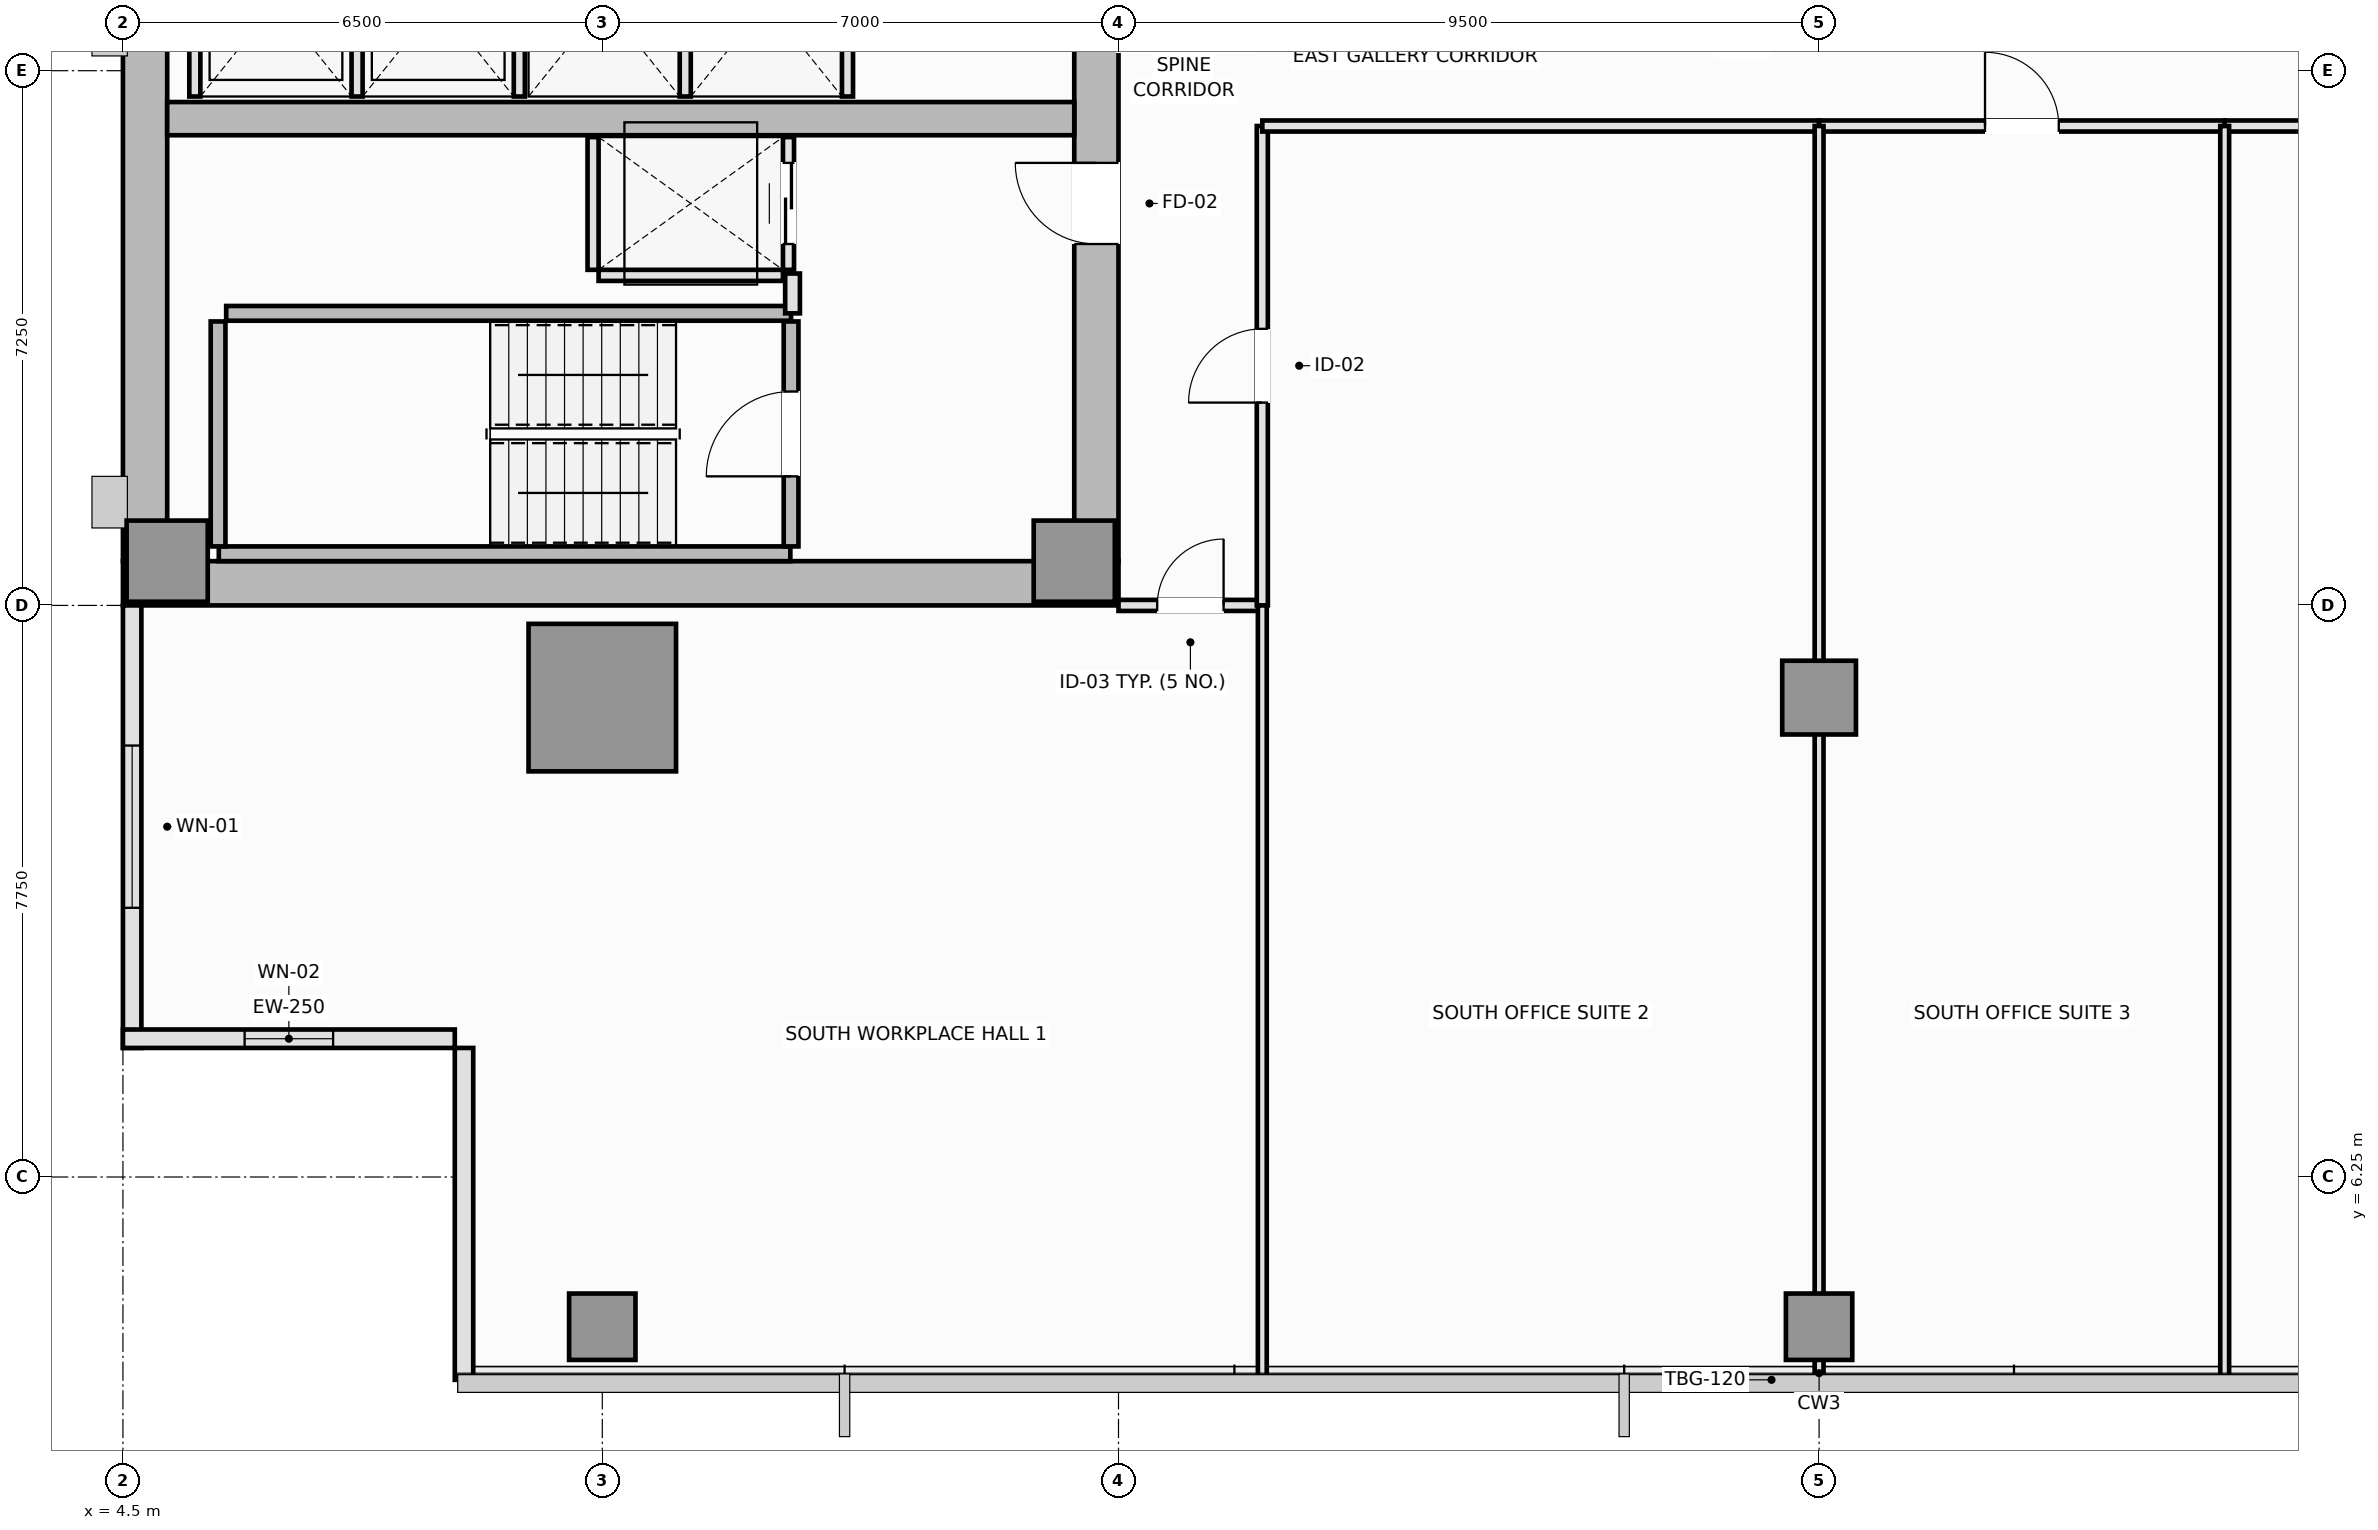
"""IFC4 building model, lengths in metres.
Left out: names, types, materials, properties, quantities, classifications, styles, units other than length and angle.
Written with IfcOpenShell. Run it as: python <this file> out.ifc"""

import sys

from ifc_helpers import new_model, si_unit, direction, frame, frame_2d, origin, origin_2d, place, context, subcontext, project, spatial, rectangle, extrude, element, fill, save


model = new_model("IFC4")
c1 = context("Model", 3, precision=1e-05, world=origin(), true_north=direction((0.0, 1.0)))
c2 = subcontext(c1, "Body", "Model", "MODEL_VIEW")
j1 = project(units=[si_unit("LENGTHUNIT", "METRE"), si_unit("PLANEANGLEUNIT", "RADIAN")], contexts=[c1])
p1 = place(None, origin())
s1 = spatial("IfcSite", under=j1, at=p1, CompositionType="ELEMENT")
p2 = place(p1, origin())
s2 = spatial("IfcBuilding", under=s1, at=p2, CompositionType="ELEMENT")
p3 = place(p2, frame((0.0, 0.0, 105.8)))
s3 = spatial("IfcBuildingStorey", under=s2, at=p3, CompositionType="ELEMENT", Elevation=105.8)
p4 = place(p3, frame((4.5, 14.3, 0.0), z_axis=(0.0, 0.0, 1.0), x_axis=(1.0, 0.0, 0.0)))
e1 = element("IfcWall", 1, at=p4, inside=s3, PredefinedType="SHEAR", context=c2, shape_type="SweptSolid", body=[
    extrude(rectangle(XDim=13.5, YDim=0.6, at=frame_2d((6.75, 0.0))), origin(), (0.0, 0.0, 1.0), 3.55),
])
p5 = place(p3, frame((4.8, 14.6, 0.0), z_axis=(0.0, 0.0, 1.0), x_axis=(0.0, 1.0, 0.0)))
e2 = element("IfcWall", 2, at=p5, inside=s3, PredefinedType="SHEAR", context=c2, shape_type="SweptSolid", body=[
    extrude(rectangle(XDim=21.3, YDim=0.6, at=frame_2d((10.65, 0.0))), origin(), (0.0, 0.0, 1.0), 3.55),
])
p6 = place(p3, frame((17.7, 14.6, 0.0), z_axis=(0.0, 0.0, 1.0), x_axis=(0.0, 1.0, 0.0)))
e3 = element("IfcWall", 3, at=p6, inside=s3, PredefinedType="SHEAR", context=c2, shape_type="SweptSolid", body=[
    extrude(rectangle(XDim=8.85, YDim=0.6, at=frame_2d((4.425, 0.0))), origin(), (0.0, 0.0, 1.0), 3.55),
])
p7 = place(p6, frame((4.3, 0.0, 0.0)))
e4 = element("IfcOpeningElement", 4, at=p7, cuts=e3, PredefinedType="OPENING", context=c2, shape_type="SweptSolid", body=[
    extrude(rectangle(XDim=1.1, YDim=2.15, at=frame_2d((0.55, 1.075))), frame((0.0, 0.31, 0.0), z_axis=(0.0, -1.0, 0.0), x_axis=(1.0, 0.0, 0.0)), (0.0, 0.0, 1.0), 0.62),
])
p8 = place(p3, frame((5.1, 20.6, 0.0), z_axis=(0.0, 0.0, 1.0), x_axis=(1.0, 0.0, 0.0)))
e5 = element("IfcWall", 5, at=p8, inside=s3, PredefinedType="SHEAR", context=c2, shape_type="SweptSolid", body=[
    extrude(rectangle(XDim=12.3, YDim=0.45, at=frame_2d((6.15, 0.0))), origin(), (0.0, 0.0, 1.0), 3.55),
])
for number, where, z_axis, x_axis in (
    (6, (5.1, 14.6, 0.0), (0.0, 0.0, 1.0), (1.0, 0.0, 0.0)),
    (7, (17.4, 14.6, 0.0), (0.0, 0.0, 1.0), (1.0, 0.0, 0.0)),
):
    element("IfcColumn", number, at=place(p3, frame(where, z_axis=z_axis, x_axis=x_axis)), inside=s3, PredefinedType="PILASTER", context=c2, shape_type="SweptSolid", body=[
        extrude(rectangle(XDim=1.1, YDim=1.1, at=origin_2d()), origin(), (0.0, 0.0, 1.0), 3.55),
    ])
p9 = place(p3, frame((11.0, 12.75, 0.0), z_axis=(0.0, 0.0, 1.0), x_axis=(1.0, 0.0, 0.0)))
e8 = element("IfcColumn", 8, at=p9, inside=s3, PredefinedType="COLUMN", context=c2, shape_type="SweptSolid", body=[
    extrude(rectangle(XDim=2.0, YDim=2.0, at=origin_2d()), origin(), (0.0, 0.0, 1.0), 3.55),
])
p10 = place(p3, frame((27.5, 12.75, 0.0), z_axis=(0.0, 0.0, 1.0), x_axis=(1.0, 0.0, 0.0)))
e9 = element("IfcColumn", 9, at=p10, inside=s3, PredefinedType="COLUMN", context=c2, shape_type="SweptSolid", body=[
    extrude(rectangle(XDim=1.0, YDim=1.0, at=origin_2d()), origin(), (0.0, 0.0, 1.0), 3.55),
])
for number, where, z_axis, x_axis in (
    (10, (11.0, 4.22, 0.0), (0.0, 0.0, 1.0), (1.0, 0.0, 0.0)),
    (11, (27.5, 4.22, 0.0), (0.0, 0.0, 1.0), (1.0, 0.0, 0.0)),
):
    element("IfcColumn", number, at=place(p3, frame(where, z_axis=z_axis, x_axis=x_axis)), inside=s3, PredefinedType="COLUMN", context=c2, shape_type="SweptSolid", body=[
        extrude(rectangle(XDim=0.9, YDim=0.9, at=origin_2d()), origin(), (0.0, 0.0, 1.0), 3.55),
    ])
p11 = place(p3, frame((4.625, 14.0, 0.0), z_axis=(0.0, 0.0, 1.0), x_axis=(0.0, -1.0, 0.0)))
e12 = element("IfcWall", 12, at=p11, inside=s3, PredefinedType="SOLIDWALL", context=c2, shape_type="SweptSolid", body=[
    extrude(rectangle(XDim=6.0, YDim=0.25, at=frame_2d((3.0, 0.0))), origin(), (0.0, 0.0, 1.0), 3.37),
])
p12 = place(p11, frame((1.9, 0.0, 0.9)))
e13 = element("IfcOpeningElement", 13, at=p12, cuts=e12, PredefinedType="OPENING", context=c2, shape_type="SweptSolid", body=[
    extrude(rectangle(XDim=2.2, YDim=1.8, at=frame_2d((1.1, 0.9))), frame((0.0, 0.135, 0.0), z_axis=(0.0, -1.0, 0.0), x_axis=(1.0, 0.0, 0.0)), (0.0, 0.0, 1.0), 0.27),
])
p13 = place(p3, frame((4.5, 8.125, 0.0), z_axis=(0.0, 0.0, 1.0), x_axis=(1.0, 0.0, 0.0)))
e14 = element("IfcWall", 14, at=p13, inside=s3, PredefinedType="SOLIDWALL", context=c2, shape_type="SweptSolid", body=[
    extrude(rectangle(XDim=4.5, YDim=0.25, at=frame_2d((2.25, 0.0))), origin(), (0.0, 0.0, 1.0), 3.37),
])
p14 = place(p13, frame((1.65, 0.0, 0.9)))
e15 = element("IfcOpeningElement", 15, at=p14, cuts=e14, PredefinedType="OPENING", context=c2, shape_type="SweptSolid", body=[
    extrude(rectangle(XDim=1.2, YDim=1.8, at=frame_2d((0.6, 0.9))), frame((0.0, 0.135, 0.0), z_axis=(0.0, -1.0, 0.0), x_axis=(1.0, 0.0, 0.0)), (0.0, 0.0, 1.0), 0.27),
])
p15 = place(p3, frame((9.125, 8.0, 0.0), z_axis=(0.0, 0.0, 1.0), x_axis=(0.0, -1.0, 0.0)))
e16 = element("IfcWall", 16, at=p15, inside=s3, PredefinedType="SOLIDWALL", context=c2, shape_type="SweptSolid", body=[
    extrude(rectangle(XDim=4.5, YDim=0.25, at=frame_2d((2.25, 0.0))), origin(), (0.0, 0.0, 1.0), 3.37),
])
p16 = place(p3, frame((5.8, 14.7, 0.0), z_axis=(0.0, 0.0, 1.0), x_axis=(1.0, 0.0, 0.0)))
e17 = element("IfcWall", 17, at=p16, inside=s3, PredefinedType="SOLIDWALL", context=c2, shape_type="SweptSolid", body=[
    extrude(rectangle(XDim=7.75, YDim=0.2, at=frame_2d((3.875, 0.0))), origin(), (0.0, 0.0, 1.0), 3.55),
])
p17 = place(p3, frame((5.79, 14.8, 0.0), z_axis=(0.0, 0.0, 1.0), x_axis=(0.0, 1.0, 0.0)))
e18 = element("IfcWall", 18, at=p17, inside=s3, PredefinedType="SOLIDWALL", context=c2, shape_type="SweptSolid", body=[
    extrude(rectangle(XDim=3.05, YDim=0.2, at=frame_2d((1.525, 0.0))), origin(), (0.0, 0.0, 1.0), 3.55),
])
p18 = place(p3, frame((5.9, 17.96, 0.0), z_axis=(0.0, 0.0, 1.0), x_axis=(1.0, 0.0, 0.0)))
e19 = element("IfcWall", 19, at=p18, inside=s3, PredefinedType="SOLIDWALL", context=c2, shape_type="SweptSolid", body=[
    extrude(rectangle(XDim=7.66, YDim=0.2, at=frame_2d((3.83, 0.0))), origin(), (0.0, 0.0, 1.0), 3.55),
])
p19 = place(p3, frame((13.56, 14.8, 0.0), z_axis=(0.0, 0.0, 1.0), x_axis=(0.0, 1.0, 0.0)))
e20 = element("IfcWall", 20, at=p19, inside=s3, PredefinedType="SOLIDWALL", context=c2, shape_type="SweptSolid", body=[
    extrude(rectangle(XDim=3.05, YDim=0.2, at=frame_2d((1.525, 0.0))), origin(), (0.0, 0.0, 1.0), 3.55),
])
p20 = place(p19, frame((0.95, 0.0, 0.0)))
e21 = element("IfcOpeningElement", 21, at=p20, cuts=e20, PredefinedType="OPENING", context=c2, shape_type="SweptSolid", body=[
    extrude(rectangle(XDim=1.15, YDim=2.15, at=frame_2d((0.575, 1.075))), frame((0.0, 0.11, 0.0), z_axis=(0.0, -1.0, 0.0), x_axis=(1.0, 0.0, 0.0)), (0.0, 0.0, 1.0), 0.22),
])
for number, where, z_axis, x_axis in (
    (22, (5.475, 20.9, 0.0), (0.0, 0.0, 1.0), (0.0, 1.0, 0.0)),
    (23, (7.675, 20.9, 0.0), (0.0, 0.0, 1.0), (0.0, 1.0, 0.0)),
    (24, (9.875, 20.9, 0.0), (0.0, 0.0, 1.0), (0.0, 1.0, 0.0)),
    (25, (12.125, 20.9, 0.0), (0.0, 0.0, 1.0), (0.0, 1.0, 0.0)),
    (26, (14.325, 20.9, 0.0), (0.0, 0.0, 1.0), (0.0, 1.0, 0.0)),
):
    element("IfcWall", number, at=place(p3, frame(where, z_axis=z_axis, x_axis=x_axis)), inside=s3, PredefinedType="PARTITIONING", context=c2, shape_type="SweptSolid", body=[
        extrude(rectangle(XDim=2.55, YDim=0.15, at=frame_2d((1.275, 0.0))), origin(), (0.0, 0.0, 1.0), 3.37),
    ])
p21 = place(p3, frame((10.95, 18.475, 0.0), z_axis=(0.0, 0.0, 1.0), x_axis=(1.0, 0.0, 0.0)))
e27 = element("IfcWall", 27, at=p21, inside=s3, PredefinedType="PARTITIONING", context=c2, shape_type="SweptSolid", body=[
    extrude(rectangle(XDim=2.5, YDim=0.15, at=frame_2d((1.25, 0.0))), origin(), (0.0, 0.0, 1.0), 3.37),
])
p22 = place(p3, frame((10.875, 18.55, 0.0), z_axis=(0.0, 0.0, 1.0), x_axis=(0.0, 1.0, 0.0)))
e28 = element("IfcWall", 28, at=p22, inside=s3, PredefinedType="PARTITIONING", context=c2, shape_type="SweptSolid", body=[
    extrude(rectangle(XDim=1.8, YDim=0.15, at=frame_2d((0.9, 0.0))), origin(), (0.0, 0.0, 1.0), 3.37),
])
p23 = place(p3, frame((13.525, 18.55, 0.0), z_axis=(0.0, 0.0, 1.0), x_axis=(0.0, 1.0, 0.0)))
e29 = element("IfcWall", 29, at=p23, inside=s3, PredefinedType="PARTITIONING", context=c2, shape_type="SweptSolid", body=[
    extrude(rectangle(XDim=1.8, YDim=0.15, at=frame_2d((0.9, 0.0))), origin(), (0.0, 0.0, 1.0), 3.37),
])
p24 = place(p23, frame((0.35, 0.0, 0.0)))
e30 = element("IfcOpeningElement", 30, at=p24, cuts=e29, PredefinedType="OPENING", context=c2, shape_type="SweptSolid", body=[
    extrude(rectangle(XDim=1.1, YDim=2.2, at=frame_2d((0.55, 1.1))), frame((0.0, 0.085, 0.0), z_axis=(0.0, -1.0, 0.0), x_axis=(1.0, 0.0, 0.0)), (0.0, 0.0, 1.0), 0.17),
])
p25 = place(p3, frame((13.58, 17.96, 0.0), z_axis=(0.0, 0.0, 1.0), x_axis=(0.0, 1.0, 0.0)))
e31 = element("IfcWall", 31, at=p25, inside=s3, PredefinedType="PARTITIONING", context=c2, shape_type="SweptSolid", body=[
    extrude(rectangle(XDim=0.54, YDim=0.2, at=frame_2d((0.27, 0.0))), origin(), (0.0, 0.0, 1.0), 3.37),
])
p26 = place(p3, frame((18.0, 14.0, 0.0), z_axis=(0.0, 0.0, 1.0), x_axis=(1.0, 0.0, 0.0)))
e32 = element("IfcWall", 32, at=p26, inside=s3, PredefinedType="PARTITIONING", context=c2, shape_type="SweptSolid", body=[
    extrude(rectangle(XDim=1.95, YDim=0.15, at=frame_2d((0.975, 0.0))), origin(), (0.0, 0.0, 1.0), 3.37),
])
p27 = place(p26, frame((0.525, 0.0, 0.0)))
e33 = element("IfcOpeningElement", 33, at=p27, cuts=e32, PredefinedType="OPENING", context=c2, shape_type="SweptSolid", body=[
    extrude(rectangle(XDim=0.9, YDim=2.1, at=frame_2d((0.45, 1.05))), frame((0.0, 0.085, 0.0), z_axis=(0.0, -1.0, 0.0), x_axis=(1.0, 0.0, 0.0)), (0.0, 0.0, 1.0), 0.17),
])
p28 = place(p3, frame((19.95, 14.0, 0.0), z_axis=(0.0, 0.0, 1.0), x_axis=(0.0, 1.0, 0.0)))
e34 = element("IfcWall", 34, at=p28, inside=s3, PredefinedType="PARTITIONING", context=c2, shape_type="SweptSolid", body=[
    extrude(rectangle(XDim=6.5, YDim=0.15, at=frame_2d((3.25, 0.0))), origin(), (0.0, 0.0, 1.0), 3.37),
])
p29 = place(p28, frame((2.75, 0.0, 0.0)))
e35 = element("IfcOpeningElement", 35, at=p29, cuts=e34, PredefinedType="OPENING", context=c2, shape_type="SweptSolid", body=[
    extrude(rectangle(XDim=1.0, YDim=2.15, at=frame_2d((0.5, 1.075))), frame((0.0, 0.085, 0.0), z_axis=(0.0, -1.0, 0.0), x_axis=(1.0, 0.0, 0.0)), (0.0, 0.0, 1.0), 0.17),
])
p30 = place(p3, frame((19.95, 20.5, 0.0), z_axis=(0.0, 0.0, 1.0), x_axis=(1.0, 0.0, 0.0)))
e36 = element("IfcWall", 36, at=p30, inside=s3, PredefinedType="PARTITIONING", context=c2, shape_type="SweptSolid", body=[
    extrude(rectangle(XDim=7.55, YDim=0.15, at=frame_2d((3.775, 0.0))), origin(), (0.0, 0.0, 1.0), 3.37),
])
p31 = place(p3, frame((27.5, 20.5, 0.0), z_axis=(0.0, 0.0, 1.0), x_axis=(1.0, 0.0, 0.0)))
e37 = element("IfcWall", 37, at=p31, inside=s3, PredefinedType="PARTITIONING", context=c2, shape_type="SweptSolid", body=[
    extrude(rectangle(XDim=5.5, YDim=0.15, at=frame_2d((2.75, 0.0))), origin(), (0.0, 0.0, 1.0), 3.37),
])
p32 = place(p31, frame((2.25, 0.0, 0.0)))
e38 = element("IfcOpeningElement", 38, at=p32, cuts=e37, PredefinedType="OPENING", context=c2, shape_type="SweptSolid", body=[
    extrude(rectangle(XDim=1.0, YDim=2.15, at=frame_2d((0.5, 1.075))), frame((0.0, 0.085, 0.0), z_axis=(0.0, -1.0, 0.0), x_axis=(1.0, 0.0, 0.0)), (0.0, 0.0, 1.0), 0.17),
])
p33 = place(p3, frame((33.0, 20.5, 0.0), z_axis=(0.0, 0.0, 1.0), x_axis=(1.0, 0.0, 0.0)))
e39 = element("IfcWall", 39, at=p33, inside=s3, PredefinedType="PARTITIONING", context=c2, shape_type="SweptSolid", body=[
    extrude(rectangle(XDim=5.2, YDim=0.15, at=frame_2d((2.6, 0.0))), origin(), (0.0, 0.0, 1.0), 3.37),
])
p34 = place(p33, frame((2.1, 0.0, 0.0)))
e40 = element("IfcOpeningElement", 40, at=p34, cuts=e39, PredefinedType="OPENING", context=c2, shape_type="SweptSolid", body=[
    extrude(rectangle(XDim=1.0, YDim=2.15, at=frame_2d((0.5, 1.075))), frame((0.0, 0.085, 0.0), z_axis=(0.0, -1.0, 0.0), x_axis=(1.0, 0.0, 0.0)), (0.0, 0.0, 1.0), 0.17),
])
p35 = place(p3, frame((19.95, 3.51, 0.0), z_axis=(0.0, 0.0, 1.0), x_axis=(0.0, 1.0, 0.0)))
e41 = element("IfcWall", 41, at=p35, inside=s3, PredefinedType="PARTITIONING", context=c2, shape_type="SweptSolid", body=[
    extrude(rectangle(XDim=10.49, YDim=0.12, at=frame_2d((5.245, 0.0))), origin(), (0.0, 0.0, 1.0), 3.37),
])
p36 = place(p3, frame((27.5, 3.51, 0.0), z_axis=(0.0, 0.0, 1.0), x_axis=(0.0, 1.0, 0.0)))
e42 = element("IfcWall", 42, at=p36, inside=s3, PredefinedType="PARTITIONING", context=c2, shape_type="SweptSolid", body=[
    extrude(rectangle(XDim=16.99, YDim=0.12, at=frame_2d((8.495, 0.0))), origin(), (0.0, 0.0, 1.0), 2.87),
])
p37 = place(p3, frame((33.0, 3.51, 0.0), z_axis=(0.0, 0.0, 1.0), x_axis=(0.0, 1.0, 0.0)))
e43 = element("IfcWall", 43, at=p37, inside=s3, PredefinedType="PARTITIONING", context=c2, shape_type="SweptSolid", body=[
    extrude(rectangle(XDim=16.99, YDim=0.12, at=frame_2d((8.495, 0.0))), origin(), (0.0, 0.0, 1.0), 3.37),
])
p38 = place(p12, origin())
e44 = element("IfcWindow", 44, at=p38, inside=s3, PartitioningType="SINGLE_PANEL", PredefinedType="WINDOW", context=c2, shape_type="SweptSolid", body=[
    extrude(rectangle(XDim=2.2, YDim=1.8, at=frame_2d((1.1, 0.9))), frame((0.0, 0.03, 0.0), z_axis=(0.0, -1.0, 0.0), x_axis=(1.0, 0.0, 0.0)), (0.0, 0.0, 1.0), 0.06),
])
fill(e13, e44)
p39 = place(p14, origin())
e45 = element("IfcWindow", 45, at=p39, inside=s3, PartitioningType="SINGLE_PANEL", PredefinedType="WINDOW", context=c2, shape_type="SweptSolid", body=[
    extrude(rectangle(XDim=1.2, YDim=1.8, at=frame_2d((0.6, 0.9))), frame((0.0, 0.03, 0.0), z_axis=(0.0, -1.0, 0.0), x_axis=(1.0, 0.0, 0.0)), (0.0, 0.0, 1.0), 0.06),
])
fill(e15, e45)
p40 = place(p20, origin())
e46 = element("IfcDoor", 46, at=p40, inside=s3, OperationType="SINGLE_SWING_LEFT", PredefinedType="DOOR", context=c2, shape_type="SweptSolid", body=[
    extrude(rectangle(XDim=1.15, YDim=2.15, at=frame_2d((0.575, 1.075))), frame((0.0, 0.025, 0.0), z_axis=(0.0, -1.0, 0.0), x_axis=(1.0, 0.0, 0.0)), (0.0, 0.0, 1.0), 0.05),
])
fill(e21, e46)
p41 = place(p24, origin())
e47 = element("IfcDoor", 47, at=p41, inside=s3, OperationType="DOUBLE_DOOR_SLIDING", PredefinedType="DOOR", context=c2, shape_type="SweptSolid", body=[
    extrude(rectangle(XDim=1.1, YDim=2.2, at=frame_2d((0.55, 1.1))), frame((0.0, 0.025, 0.0), z_axis=(0.0, -1.0, 0.0), x_axis=(1.0, 0.0, 0.0)), (0.0, 0.0, 1.0), 0.05),
])
fill(e30, e47)
p42 = place(p7, origin())
e48 = element("IfcDoor", 48, at=p42, inside=s3, OperationType="SINGLE_SWING_RIGHT", PredefinedType="DOOR", context=c2, shape_type="SweptSolid", body=[
    extrude(rectangle(XDim=1.1, YDim=2.15, at=frame_2d((0.55, 1.075))), frame((0.0, 0.025, 0.0), z_axis=(0.0, -1.0, 0.0), x_axis=(1.0, 0.0, 0.0)), (0.0, 0.0, 1.0), 0.05),
])
fill(e4, e48)
p43 = place(p27, origin())
e49 = element("IfcDoor", 49, at=p43, inside=s3, OperationType="SINGLE_SWING_RIGHT", PredefinedType="DOOR", context=c2, shape_type="SweptSolid", body=[
    extrude(rectangle(XDim=0.9, YDim=2.1, at=frame_2d((0.45, 1.05))), frame((0.0, 0.025, 0.0), z_axis=(0.0, -1.0, 0.0), x_axis=(1.0, 0.0, 0.0)), (0.0, 0.0, 1.0), 0.05),
])
fill(e33, e49)
p44 = place(p29, origin())
e50 = element("IfcDoor", 50, at=p44, inside=s3, OperationType="SINGLE_SWING_LEFT", PredefinedType="DOOR", context=c2, shape_type="SweptSolid", body=[
    extrude(rectangle(XDim=1.0, YDim=2.15, at=frame_2d((0.5, 1.075))), frame((0.0, 0.025, 0.0), z_axis=(0.0, -1.0, 0.0), x_axis=(1.0, 0.0, 0.0)), (0.0, 0.0, 1.0), 0.05),
])
fill(e35, e50)
p45 = place(p32, origin())
e51 = element("IfcDoor", 51, at=p45, inside=s3, OperationType="SINGLE_SWING_LEFT", PredefinedType="DOOR", context=c2, shape_type="SweptSolid", body=[
    extrude(rectangle(XDim=1.0, YDim=2.15, at=frame_2d((0.5, 1.075))), frame((0.0, 0.025, 0.0), z_axis=(0.0, -1.0, 0.0), x_axis=(1.0, 0.0, 0.0)), (0.0, 0.0, 1.0), 0.05),
])
fill(e38, e51)
save(model, sys.argv[1])
